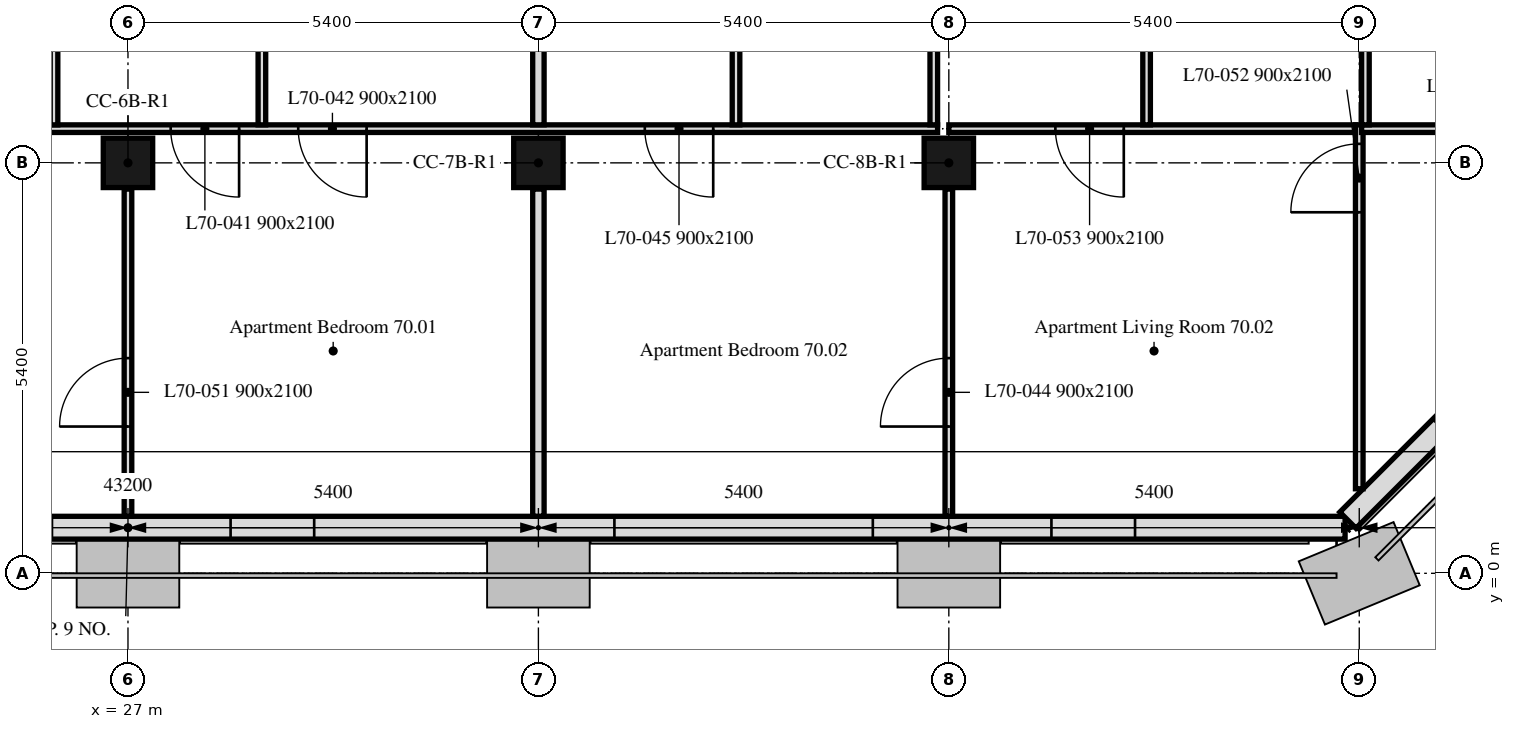
"""IFC4 building model, lengths in metres.
Left out: names, types, materials, properties, quantities, classifications, styles, units other than length and angle.
Written with IfcOpenShell. Run it as: python <this file> out.ifc"""

import sys

from ifc_helpers import new_model, si_unit, direction, frame, frame_2d, origin, origin_2d, place, context, subcontext, project, spatial, rectangle, extrude, element, fill, save


model = new_model("IFC4")
c1 = context("Model", 3, precision=1e-05, world=origin(), true_north=direction((0.0, 1.0)))
c2 = subcontext(c1, "Body", "Model", "MODEL_VIEW")
j1 = project(units=[si_unit("LENGTHUNIT", "METRE"), si_unit("PLANEANGLEUNIT", "RADIAN")], contexts=[c1])
p1 = place(None, origin())
s1 = spatial("IfcSite", under=j1, at=p1, CompositionType="ELEMENT")
p2 = place(p1, origin())
s2 = spatial("IfcBuilding", under=s1, at=p2, CompositionType="ELEMENT")
p3 = place(p2, frame((0.0, 0.0, 285.1)))
s3 = spatial("IfcBuildingStorey", under=s2, at=p3, CompositionType="ELEMENT", Elevation=285.1)
for number, where, z_axis, x_axis in (
    (1, (27.0, 5.4, 0.0), (0.0, 0.0, 1.0), (1.0, 0.0, 0.0)),
    (2, (32.4, 5.4, 0.0), (0.0, 0.0, 1.0), (1.0, 0.0, 0.0)),
    (3, (37.8, 5.4, 0.0), (0.0, 0.0, 1.0), (1.0, 0.0, 0.0)),
):
    element("IfcColumn", number, at=place(p3, frame(where, z_axis=z_axis, x_axis=x_axis)), inside=s3, PredefinedType="COLUMN", context=c2, shape_type="SweptSolid", body=[
        extrude(rectangle(XDim=0.65, YDim=0.65, at=origin_2d()), origin(), (0.0, 0.0, 1.0), 3.0),
    ])
p4 = place(p3, frame((10.986, 0.6, 0.0), z_axis=(0.0, 0.0, 1.0), x_axis=(1.0, 0.0, 0.0)))
e4 = element("IfcWall", 4, at=p4, inside=s3, PredefinedType="SOLIDWALL", context=c2, shape_type="SweptSolid", body=[
    extrude(rectangle(XDim=32.027, YDim=0.3, at=frame_2d((16.014, 0.0))), origin(), (0.0, 0.0, 1.0), 3.0),
])
p5 = place(p4, frame((0.814, 0.0, 0.9)))
e5 = element("IfcOpeningElement", 5, at=p5, cuts=e4, PredefinedType="OPENING", context=c2, shape_type="SweptSolid", body=[
    extrude(rectangle(XDim=3.4, YDim=1.7, at=frame_2d((1.7, 0.85))), frame((0.0, 0.16, 0.0), z_axis=(0.0, -1.0, 0.0), x_axis=(1.0, 0.0, 0.0)), (0.0, 0.0, 1.0), 0.32),
])
p6 = place(p4, frame((6.564, 0.0, 0.9)))
e6 = element("IfcOpeningElement", 6, at=p6, cuts=e4, PredefinedType="OPENING", context=c2, shape_type="SweptSolid", body=[
    extrude(rectangle(XDim=1.1, YDim=1.7, at=frame_2d((0.55, 0.85))), frame((0.0, 0.16, 0.0), z_axis=(0.0, -1.0, 0.0), x_axis=(1.0, 0.0, 0.0)), (0.0, 0.0, 1.0), 0.32),
])
p7 = place(p4, frame((11.614, 0.0, 0.9)))
e7 = element("IfcOpeningElement", 7, at=p7, cuts=e4, PredefinedType="OPENING", context=c2, shape_type="SweptSolid", body=[
    extrude(rectangle(XDim=3.4, YDim=1.7, at=frame_2d((1.7, 0.85))), frame((0.0, 0.16, 0.0), z_axis=(0.0, -1.0, 0.0), x_axis=(1.0, 0.0, 0.0)), (0.0, 0.0, 1.0), 0.32),
])
p8 = place(p4, frame((17.364, 0.0, 0.9)))
e8 = element("IfcOpeningElement", 8, at=p8, cuts=e4, PredefinedType="OPENING", context=c2, shape_type="SweptSolid", body=[
    extrude(rectangle(XDim=1.1, YDim=1.7, at=frame_2d((0.55, 0.85))), frame((0.0, 0.16, 0.0), z_axis=(0.0, -1.0, 0.0), x_axis=(1.0, 0.0, 0.0)), (0.0, 0.0, 1.0), 0.32),
])
p9 = place(p4, frame((22.414, 0.0, 0.9)))
e9 = element("IfcOpeningElement", 9, at=p9, cuts=e4, PredefinedType="OPENING", context=c2, shape_type="SweptSolid", body=[
    extrude(rectangle(XDim=3.4, YDim=1.7, at=frame_2d((1.7, 0.85))), frame((0.0, 0.16, 0.0), z_axis=(0.0, -1.0, 0.0), x_axis=(1.0, 0.0, 0.0)), (0.0, 0.0, 1.0), 0.32),
])
p10 = place(p4, frame((28.164, 0.0, 0.9)))
e10 = element("IfcOpeningElement", 10, at=p10, cuts=e4, PredefinedType="OPENING", context=c2, shape_type="SweptSolid", body=[
    extrude(rectangle(XDim=1.1, YDim=1.7, at=frame_2d((0.55, 0.85))), frame((0.0, 0.16, 0.0), z_axis=(0.0, -1.0, 0.0), x_axis=(1.0, 0.0, 0.0)), (0.0, 0.0, 1.0), 0.32),
])
p11 = place(p3, frame((43.051, 0.699, 0.0), z_axis=(0.0, 0.0, 1.0), x_axis=(0.707106781187, 0.707106781187, 0.0)))
e11 = element("IfcWall", 11, at=p11, inside=s3, PredefinedType="SOLIDWALL", context=c2, shape_type="SweptSolid", body=[
    extrude(rectangle(XDim=6.86, YDim=0.3, at=frame_2d((3.43, 0.0))), origin(), (0.0, 0.0, 1.0), 3.0),
])
p12 = place(p11, frame((1.73, 0.0, 0.9)))
e12 = element("IfcOpeningElement", 12, at=p12, cuts=e11, PredefinedType="OPENING", context=c2, shape_type="SweptSolid", body=[
    extrude(rectangle(XDim=3.4, YDim=1.7, at=frame_2d((1.7, 0.85))), frame((0.0, 0.16, 0.0), z_axis=(0.0, -1.0, 0.0), x_axis=(1.0, 0.0, 0.0)), (0.0, 0.0, 1.0), 0.32),
])
p13 = place(p3, frame((37.652, 5.85, 0.0), z_axis=(0.0, 0.0, 1.0), x_axis=(-1.0, 0.0, 0.0)))
e13 = element("IfcWall", 13, at=p13, inside=s3, PredefinedType="PARTITIONING", context=c2, shape_type="SweptSolid", body=[
    extrude(rectangle(XDim=31.501, YDim=0.1, at=frame_2d((15.75, 0.0))), origin(), (0.0, 0.0, 1.0), 2.4),
])
p14 = place(p13, frame((12.923, 0.0, 0.0)))
e14 = element("IfcOpeningElement", 14, at=p14, cuts=e13, PredefinedType="OPENING", context=c2, shape_type="SweptSolid", body=[
    extrude(rectangle(XDim=0.9, YDim=2.1, at=frame_2d((0.45, 1.05))), frame((0.0, 0.05, 0.0), z_axis=(0.0, -1.0, 0.0), x_axis=(1.0, 0.0, 0.0)), (0.0, 0.0, 1.0), 0.1),
])
p15 = place(p13, frame((29.422, 0.0, 0.0)))
e15 = element("IfcOpeningElement", 15, at=p15, cuts=e13, PredefinedType="OPENING", context=c2, shape_type="SweptSolid", body=[
    extrude(rectangle(XDim=0.9, YDim=2.1, at=frame_2d((0.45, 1.05))), frame((0.0, 0.05, 0.0), z_axis=(0.0, -1.0, 0.0), x_axis=(1.0, 0.0, 0.0)), (0.0, 0.0, 1.0), 0.1),
])
p16 = place(p13, frame((28.182, 0.0, 0.0)))
e16 = element("IfcOpeningElement", 16, at=p16, cuts=e13, PredefinedType="OPENING", context=c2, shape_type="SweptSolid", body=[
    extrude(rectangle(XDim=0.9, YDim=2.1, at=frame_2d((0.45, 1.05))), frame((0.0, 0.05, 0.0), z_axis=(0.0, -1.0, 0.0), x_axis=(1.0, 0.0, 0.0)), (0.0, 0.0, 1.0), 0.1),
])
p17 = place(p13, frame((23.942, 0.0, 0.0)))
e17 = element("IfcOpeningElement", 17, at=p17, cuts=e13, PredefinedType="OPENING", context=c2, shape_type="SweptSolid", body=[
    extrude(rectangle(XDim=0.9, YDim=2.1, at=frame_2d((0.45, 1.05))), frame((0.0, 0.05, 0.0), z_axis=(0.0, -1.0, 0.0), x_axis=(1.0, 0.0, 0.0)), (0.0, 0.0, 1.0), 0.1),
])
p18 = place(p13, frame((22.572, 0.0, 0.0)))
e18 = element("IfcOpeningElement", 18, at=p18, cuts=e13, PredefinedType="OPENING", context=c2, shape_type="SweptSolid", body=[
    extrude(rectangle(XDim=0.9, YDim=2.1, at=frame_2d((0.45, 1.05))), frame((0.0, 0.05, 0.0), z_axis=(0.0, -1.0, 0.0), x_axis=(1.0, 0.0, 0.0)), (0.0, 0.0, 1.0), 0.1),
])
p19 = place(p13, frame((19.466, 0.0, 0.0)))
e19 = element("IfcOpeningElement", 19, at=p19, cuts=e13, PredefinedType="OPENING", context=c2, shape_type="SweptSolid", body=[
    extrude(rectangle(XDim=0.9, YDim=2.1, at=frame_2d((0.45, 1.05))), frame((0.0, 0.05, 0.0), z_axis=(0.0, -1.0, 0.0), x_axis=(1.0, 0.0, 0.0)), (0.0, 0.0, 1.0), 0.1),
])
p20 = place(p13, frame((9.19, 0.0, 0.0)))
e20 = element("IfcOpeningElement", 20, at=p20, cuts=e13, PredefinedType="OPENING", context=c2, shape_type="SweptSolid", body=[
    extrude(rectangle(XDim=0.9, YDim=2.1, at=frame_2d((0.45, 1.05))), frame((0.0, 0.05, 0.0), z_axis=(0.0, -1.0, 0.0), x_axis=(1.0, 0.0, 0.0)), (0.0, 0.0, 1.0), 0.1),
])
p21 = place(p13, frame((7.512, 0.0, 0.0)))
e21 = element("IfcOpeningElement", 21, at=p21, cuts=e13, PredefinedType="OPENING", context=c2, shape_type="SweptSolid", body=[
    extrude(rectangle(XDim=0.9, YDim=2.1, at=frame_2d((0.45, 1.05))), frame((0.0, 0.05, 0.0), z_axis=(0.0, -1.0, 0.0), x_axis=(1.0, 0.0, 0.0)), (0.0, 0.0, 1.0), 0.1),
])
p22 = place(p13, frame((2.952, 0.0, 0.0)))
e22 = element("IfcOpeningElement", 22, at=p22, cuts=e13, PredefinedType="OPENING", context=c2, shape_type="SweptSolid", body=[
    extrude(rectangle(XDim=0.9, YDim=2.1, at=frame_2d((0.45, 1.05))), frame((0.0, 0.05, 0.0), z_axis=(0.0, -1.0, 0.0), x_axis=(1.0, 0.0, 0.0)), (0.0, 0.0, 1.0), 0.1),
])
p23 = place(p13, frame((18.096, 0.0, 0.0)))
e23 = element("IfcOpeningElement", 23, at=p23, cuts=e13, PredefinedType="OPENING", context=c2, shape_type="SweptSolid", body=[
    extrude(rectangle(XDim=0.9, YDim=2.1, at=frame_2d((0.45, 1.05))), frame((0.0, 0.05, 0.0), z_axis=(0.0, -1.0, 0.0), x_axis=(1.0, 0.0, 0.0)), (0.0, 0.0, 1.0), 0.1),
])
p24 = place(p3, frame((27.0, 0.751, 0.0), z_axis=(0.0, 0.0, 1.0), x_axis=(0.0, 1.0, 0.0)))
e24 = element("IfcWall", 24, at=p24, inside=s3, PredefinedType="PARTITIONING", context=c2, shape_type="SweptSolid", body=[
    extrude(rectangle(XDim=4.304, YDim=0.1, at=frame_2d((2.152, 0.0))), origin(), (0.0, 0.0, 1.0), 2.4),
])
p25 = place(p24, frame((1.18, 0.0, 0.0)))
e25 = element("IfcOpeningElement", 25, at=p25, cuts=e24, PredefinedType="OPENING", context=c2, shape_type="SweptSolid", body=[
    extrude(rectangle(XDim=0.9, YDim=2.1, at=frame_2d((0.45, 1.05))), frame((0.0, 0.05, 0.0), z_axis=(0.0, -1.0, 0.0), x_axis=(1.0, 0.0, 0.0)), (0.0, 0.0, 1.0), 0.1),
])
p26 = place(p3, frame((32.4, 0.751, 0.0), z_axis=(0.0, 0.0, 1.0), x_axis=(0.0, 1.0, 0.0)))
e26 = element("IfcWall", 26, at=p26, inside=s3, PredefinedType="PARTITIONING", context=c2, shape_type="SweptSolid", body=[
    extrude(rectangle(XDim=4.304, YDim=0.15, at=frame_2d((2.152, 0.0))), origin(), (0.0, 0.0, 1.0), 2.4),
])
for number, where, z_axis, x_axis in (
    (27, (26.027, 5.9, 0.0), (0.0, 0.0, 1.0), (0.0, 1.0, 0.0)),
    (28, (28.762, 5.9, 0.0), (0.0, 0.0, 1.0), (0.0, 1.0, 0.0)),
):
    element("IfcWall", number, at=place(p3, frame(where, z_axis=z_axis, x_axis=x_axis)), inside=s3, PredefinedType="PARTITIONING", context=c2, shape_type="SweptSolid", body=[
        extrude(rectangle(XDim=7.975, YDim=0.1, at=frame_2d((3.988, 0.0))), origin(), (0.0, 0.0, 1.0), 3.0),
    ])
p27 = place(p3, frame((32.4, 5.9, 0.0), z_axis=(0.0, 0.0, 1.0), x_axis=(0.0, 1.0, 0.0)))
e29 = element("IfcWall", 29, at=p27, inside=s3, PredefinedType="PARTITIONING", context=c2, shape_type="SweptSolid", body=[
    extrude(rectangle(XDim=4.555, YDim=0.15, at=frame_2d((2.278, 0.0))), origin(), (0.0, 0.0, 1.0), 2.4),
])
p28 = place(p3, frame((37.8, 0.751, 0.0), z_axis=(0.0, 0.0, 1.0), x_axis=(0.0, 1.0, 0.0)))
e30 = element("IfcWall", 30, at=p28, inside=s3, PredefinedType="PARTITIONING", context=c2, shape_type="SweptSolid", body=[
    extrude(rectangle(XDim=4.304, YDim=0.1, at=frame_2d((2.152, 0.0))), origin(), (0.0, 0.0, 1.0), 2.4),
])
p29 = place(p28, frame((1.18, 0.0, 0.0)))
e31 = element("IfcOpeningElement", 31, at=p29, cuts=e30, PredefinedType="OPENING", context=c2, shape_type="SweptSolid", body=[
    extrude(rectangle(XDim=0.9, YDim=2.1, at=frame_2d((0.45, 1.05))), frame((0.0, 0.05, 0.0), z_axis=(0.0, -1.0, 0.0), x_axis=(1.0, 0.0, 0.0)), (0.0, 0.0, 1.0), 0.1),
])
p30 = place(p3, frame((43.2, 1.112, 0.0), z_axis=(0.0, 0.0, 1.0), x_axis=(0.0, 1.0, 0.0)))
e32 = element("IfcWall", 32, at=p30, inside=s3, PredefinedType="PARTITIONING", context=c2, shape_type="SweptSolid", body=[
    extrude(rectangle(XDim=4.788, YDim=0.1, at=frame_2d((2.394, 0.0))), origin(), (0.0, 0.0, 1.0), 3.0),
])
p31 = place(p30, frame((3.638, 0.0, 0.0)))
e33 = element("IfcOpeningElement", 33, at=p31, cuts=e32, PredefinedType="OPENING", context=c2, shape_type="SweptSolid", body=[
    extrude(rectangle(XDim=0.9, YDim=2.1, at=frame_2d((0.45, 1.05))), frame((0.0, 0.05, 0.0), z_axis=(0.0, -1.0, 0.0), x_axis=(1.0, 0.0, 0.0)), (0.0, 0.0, 1.0), 0.1),
])
p32 = place(p3, frame((43.15, 5.85, 0.0), z_axis=(0.0, 0.0, 1.0), x_axis=(-1.0, 0.0, 0.0)))
e34 = element("IfcWall", 34, at=p32, inside=s3, PredefinedType="PARTITIONING", context=c2, shape_type="SweptSolid", body=[
    extrude(rectangle(XDim=5.35, YDim=0.1, at=frame_2d((2.675, 0.0))), origin(), (0.0, 0.0, 1.0), 3.0),
])
p33 = place(p32, frame((3.048, 0.0, 0.0)))
e35 = element("IfcOpeningElement", 35, at=p33, cuts=e34, PredefinedType="OPENING", context=c2, shape_type="SweptSolid", body=[
    extrude(rectangle(XDim=0.9, YDim=2.1, at=frame_2d((0.45, 1.05))), frame((0.0, 0.05, 0.0), z_axis=(0.0, -1.0, 0.0), x_axis=(1.0, 0.0, 0.0)), (0.0, 0.0, 1.0), 0.1),
])
p34 = place(p3, frame((47.849, 5.85, 0.0), z_axis=(0.0, 0.0, 1.0), x_axis=(-1.0, 0.0, 0.0)))
e36 = element("IfcWall", 36, at=p34, inside=s3, PredefinedType="PARTITIONING", context=c2, shape_type="SweptSolid", body=[
    extrude(rectangle(XDim=4.618, YDim=0.1, at=frame_2d((2.309, 0.0))), origin(), (0.0, 0.0, 1.0), 3.0),
])
p35 = place(p34, frame((2.333, 0.0, 0.0)))
e37 = element("IfcOpeningElement", 37, at=p35, cuts=e36, PredefinedType="OPENING", context=c2, shape_type="SweptSolid", body=[
    extrude(rectangle(XDim=0.9, YDim=2.1, at=frame_2d((0.45, 1.05))), frame((0.0, 0.05, 0.0), z_axis=(0.0, -1.0, 0.0), x_axis=(1.0, 0.0, 0.0)), (0.0, 0.0, 1.0), 0.1),
])
p36 = place(p3, frame((35.0, 5.9, 0.0), z_axis=(0.0, 0.0, 1.0), x_axis=(0.0, 1.0, 0.0)))
e38 = element("IfcWall", 38, at=p36, inside=s3, PredefinedType="PARTITIONING", context=c2, shape_type="SweptSolid", body=[
    extrude(rectangle(XDim=7.975, YDim=0.1, at=frame_2d((3.988, 0.0))), origin(), (0.0, 0.0, 1.0), 2.4),
])
p37 = place(p3, frame((37.602, 5.9, 0.0), z_axis=(0.0, 0.0, 1.0), x_axis=(0.0, 1.0, 0.0)))
e39 = element("IfcWall", 39, at=p37, inside=s3, PredefinedType="PARTITIONING", context=c2, shape_type="SweptSolid", body=[
    extrude(rectangle(XDim=4.555, YDim=0.1, at=frame_2d((2.278, 0.0))), origin(), (0.0, 0.0, 1.0), 2.4),
])
p38 = place(p37, frame((1.787, 0.0, 0.0)))
e40 = element("IfcOpeningElement", 40, at=p38, cuts=e39, PredefinedType="OPENING", context=c2, shape_type="SweptSolid", body=[
    extrude(rectangle(XDim=0.9, YDim=2.1, at=frame_2d((0.45, 1.05))), frame((0.0, 0.05, 0.0), z_axis=(0.0, -1.0, 0.0), x_axis=(1.0, 0.0, 0.0)), (0.0, 0.0, 1.0), 0.1),
])
p39 = place(p3, frame((40.402, 5.9, 0.0), z_axis=(0.0, 0.0, 1.0), x_axis=(0.0, 1.0, 0.0)))
e41 = element("IfcWall", 41, at=p39, inside=s3, PredefinedType="PARTITIONING", context=c2, shape_type="SweptSolid", body=[
    extrude(rectangle(XDim=7.975, YDim=0.1, at=frame_2d((3.988, 0.0))), origin(), (0.0, 0.0, 1.0), 2.4),
])
p40 = place(p39, frame((2.3, 0.0, 0.0)))
e42 = element("IfcOpeningElement", 42, at=p40, cuts=e41, PredefinedType="OPENING", context=c2, shape_type="SweptSolid", body=[
    extrude(rectangle(XDim=0.9, YDim=2.1, at=frame_2d((0.45, 1.05))), frame((0.0, 0.05, 0.0), z_axis=(0.0, -1.0, 0.0), x_axis=(1.0, 0.0, 0.0)), (0.0, 0.0, 1.0), 0.1),
])
p41 = place(p39, frame((6.35, 0.0, 0.0)))
e43 = element("IfcOpeningElement", 43, at=p41, cuts=e41, PredefinedType="OPENING", context=c2, shape_type="SweptSolid", body=[
    extrude(rectangle(XDim=0.9, YDim=2.1, at=frame_2d((0.45, 1.05))), frame((0.0, 0.05, 0.0), z_axis=(0.0, -1.0, 0.0), x_axis=(1.0, 0.0, 0.0)), (0.0, 0.0, 1.0), 0.1),
])
p42 = place(p3, frame((43.281, 5.9, 0.0), z_axis=(0.0, 0.0, 1.0), x_axis=(0.0, 1.0, 0.0)))
e44 = element("IfcWall", 44, at=p42, inside=s3, PredefinedType="PARTITIONING", context=c2, shape_type="SweptSolid", body=[
    extrude(rectangle(XDim=4.555, YDim=0.1, at=frame_2d((2.278, 0.0))), origin(), (0.0, 0.0, 1.0), 3.0),
])
p43 = place(p8, origin())
e45 = element("IfcWindow", 45, at=p43, inside=s3, PartitioningType="SINGLE_PANEL", PredefinedType="WINDOW", context=c2, shape_type="SweptSolid", body=[
    extrude(rectangle(XDim=1.1, YDim=1.7, at=frame_2d((0.55, 0.85))), frame((0.0, 0.03, 0.0), z_axis=(0.0, -1.0, 0.0), x_axis=(1.0, 0.0, 0.0)), (0.0, 0.0, 1.0), 0.06),
])
fill(e8, e45)
p44 = place(p9, origin())
e46 = element("IfcWindow", 46, at=p44, inside=s3, PartitioningType="SINGLE_PANEL", PredefinedType="WINDOW", context=c2, shape_type="SweptSolid", body=[
    extrude(rectangle(XDim=3.4, YDim=1.7, at=frame_2d((1.7, 0.85))), frame((0.0, 0.03, 0.0), z_axis=(0.0, -1.0, 0.0), x_axis=(1.0, 0.0, 0.0)), (0.0, 0.0, 1.0), 0.06),
])
fill(e9, e46)
p45 = place(p10, origin())
e47 = element("IfcWindow", 47, at=p45, inside=s3, PartitioningType="SINGLE_PANEL", PredefinedType="WINDOW", context=c2, shape_type="SweptSolid", body=[
    extrude(rectangle(XDim=1.1, YDim=1.7, at=frame_2d((0.55, 0.85))), frame((0.0, 0.03, 0.0), z_axis=(0.0, -1.0, 0.0), x_axis=(1.0, 0.0, 0.0)), (0.0, 0.0, 1.0), 0.06),
])
fill(e10, e47)
p46 = place(p20, origin())
e48 = element("IfcDoor", 48, at=p46, inside=s3, OperationType="SINGLE_SWING_LEFT", PredefinedType="DOOR", context=c2, shape_type="SweptSolid", body=[
    extrude(rectangle(XDim=0.9, YDim=2.1, at=frame_2d((0.45, 1.05))), frame((0.0, 0.025, 0.0), z_axis=(0.0, -1.0, 0.0), x_axis=(1.0, 0.0, 0.0)), (0.0, 0.0, 1.0), 0.05),
])
fill(e20, e48)
p47 = place(p21, origin())
e49 = element("IfcDoor", 49, at=p47, inside=s3, OperationType="SINGLE_SWING_RIGHT", PredefinedType="DOOR", context=c2, shape_type="SweptSolid", body=[
    extrude(rectangle(XDim=0.9, YDim=2.1, at=frame_2d((0.45, 1.05))), frame((0.0, 0.025, 0.0), z_axis=(0.0, -1.0, 0.0), x_axis=(1.0, 0.0, 0.0)), (0.0, 0.0, 1.0), 0.05),
])
fill(e21, e49)
p48 = place(p29, origin())
e50 = element("IfcDoor", 50, at=p48, inside=s3, OperationType="SINGLE_SWING_RIGHT", PredefinedType="DOOR", context=c2, shape_type="SweptSolid", body=[
    extrude(rectangle(XDim=0.9, YDim=2.1, at=frame_2d((0.45, 1.05))), frame((0.0, 0.025, 0.0), z_axis=(0.0, -1.0, 0.0), x_axis=(1.0, 0.0, 0.0)), (0.0, 0.0, 1.0), 0.05),
])
fill(e31, e50)
p49 = place(p22, origin())
e51 = element("IfcDoor", 51, at=p49, inside=s3, OperationType="SINGLE_SWING_RIGHT", PredefinedType="DOOR", context=c2, shape_type="SweptSolid", body=[
    extrude(rectangle(XDim=0.9, YDim=2.1, at=frame_2d((0.45, 1.05))), frame((0.0, 0.025, 0.0), z_axis=(0.0, -1.0, 0.0), x_axis=(1.0, 0.0, 0.0)), (0.0, 0.0, 1.0), 0.05),
])
fill(e22, e51)
p50 = place(p25, origin())
e52 = element("IfcDoor", 52, at=p50, inside=s3, OperationType="SINGLE_SWING_RIGHT", PredefinedType="DOOR", context=c2, shape_type="SweptSolid", body=[
    extrude(rectangle(XDim=0.9, YDim=2.1, at=frame_2d((0.45, 1.05))), frame((0.0, 0.025, 0.0), z_axis=(0.0, -1.0, 0.0), x_axis=(1.0, 0.0, 0.0)), (0.0, 0.0, 1.0), 0.05),
])
fill(e25, e52)
p51 = place(p31, origin())
e53 = element("IfcDoor", 53, at=p51, inside=s3, OperationType="SINGLE_SWING_LEFT", PredefinedType="DOOR", context=c2, shape_type="SweptSolid", body=[
    extrude(rectangle(XDim=0.9, YDim=2.1, at=frame_2d((0.45, 1.05))), frame((0.0, 0.025, 0.0), z_axis=(0.0, -1.0, 0.0), x_axis=(1.0, 0.0, 0.0)), (0.0, 0.0, 1.0), 0.05),
])
fill(e33, e53)
p52 = place(p33, origin())
e54 = element("IfcDoor", 54, at=p52, inside=s3, OperationType="SINGLE_SWING_RIGHT", PredefinedType="DOOR", context=c2, shape_type="SweptSolid", body=[
    extrude(rectangle(XDim=0.9, YDim=2.1, at=frame_2d((0.45, 1.05))), frame((0.0, 0.025, 0.0), z_axis=(0.0, -1.0, 0.0), x_axis=(1.0, 0.0, 0.0)), (0.0, 0.0, 1.0), 0.05),
])
fill(e35, e54)
save(model, sys.argv[1])
